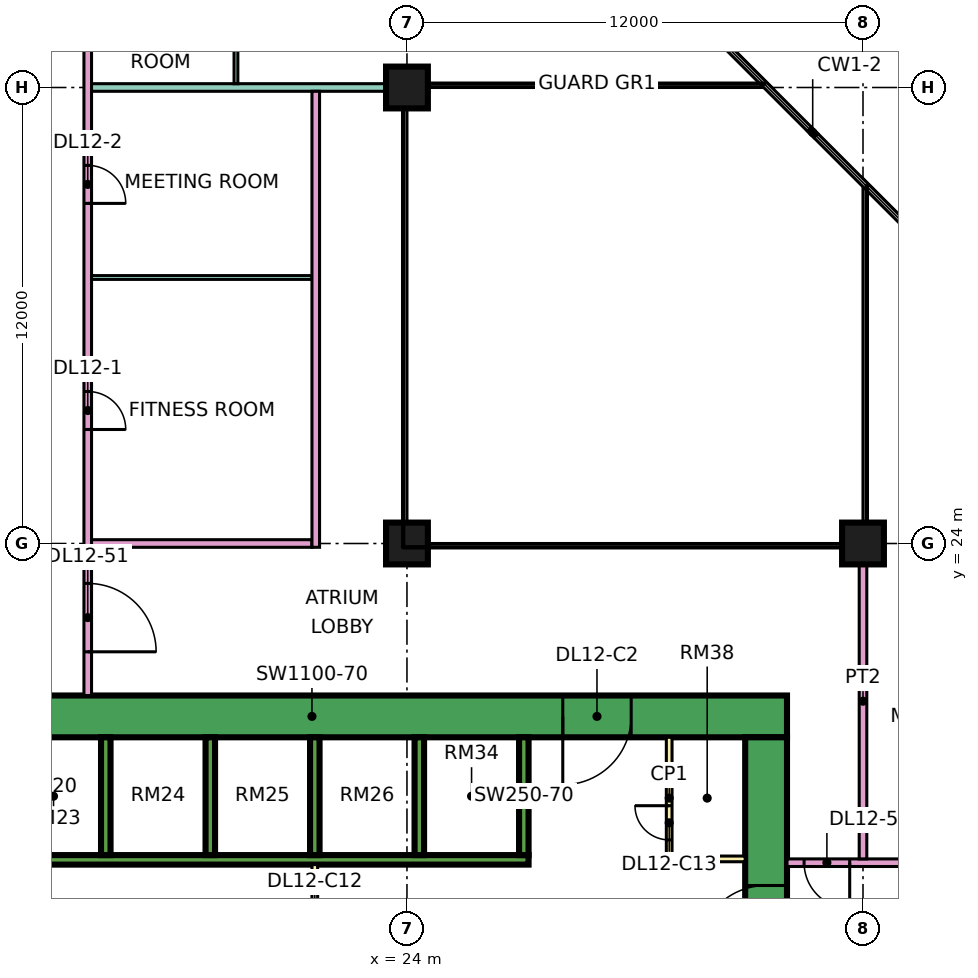
"""IFC4 building model, lengths in metres.
Left out: names, types, materials, properties, quantities, classifications, styles, units other than length and angle.
Written with IfcOpenShell. Run it as: python <this file> out.ifc"""

import sys

from ifc_helpers import new_model, si_unit, direction, frame, frame_2d, origin, origin_2d, place, context, subcontext, project, spatial, rectangle, extrude, element, fill, save


model = new_model("IFC4")
c1 = context("Model", 3, precision=1e-05, world=origin(), true_north=direction((0.0, 1.0)))
c2 = subcontext(c1, "Body", "Model", "MODEL_VIEW")
j1 = project(units=[si_unit("LENGTHUNIT", "METRE"), si_unit("PLANEANGLEUNIT", "RADIAN")], contexts=[c1])
p1 = place(None, origin())
s1 = spatial("IfcSite", under=j1, at=p1, CompositionType="ELEMENT")
p2 = place(p1, origin())
s2 = spatial("IfcBuilding", under=s1, at=p2, CompositionType="ELEMENT")
p3 = place(p2, frame((0.0, 0.0, 60.15)))
s3 = spatial("IfcBuildingStorey", under=s2, at=p3, CompositionType="ELEMENT", Elevation=60.15)
for number, where, z_axis, x_axis in (
    (1, (24.0, 24.0, 0.0), (0.0, 0.0, 1.0), (1.0, 0.0, 0.0)),
    (2, (24.0, 36.0, 0.0), (0.0, 0.0, 1.0), (1.0, 0.0, 0.0)),
    (3, (36.0, 24.0, 0.0), (0.0, 0.0, 1.0), (1.0, 0.0, 0.0)),
):
    element("IfcColumn", number, at=place(p3, frame(where, z_axis=z_axis, x_axis=x_axis)), inside=s3, PredefinedType="COLUMN", context=c2, shape_type="SweptSolid", body=[
        extrude(rectangle(XDim=1.1, YDim=1.1, at=origin_2d()), origin(), (0.0, 0.0, 1.0), 3.75),
    ])
p4 = place(p3, frame((9.0, 19.45, 0.0), z_axis=(0.0, 0.0, 1.0), x_axis=(1.0, 0.0, 0.0)))
e4 = element("IfcWall", 4, at=p4, inside=s3, PredefinedType="SHEAR", context=c2, shape_type="SweptSolid", body=[
    extrude(rectangle(XDim=25.0, YDim=1.1, at=frame_2d((12.5, 0.0))), origin(), (0.0, 0.0, 1.0), 3.75),
])
p5 = place(p4, frame((19.1, 0.0, 0.0)))
e5 = element("IfcOpeningElement", 5, at=p5, cuts=e4, PredefinedType="OPENING", context=c2, shape_type="SweptSolid", body=[
    extrude(rectangle(XDim=1.8, YDim=2.4, at=frame_2d((0.9, 1.2))), frame((0.0, 0.56, 0.0), z_axis=(0.0, -1.0, 0.0), x_axis=(1.0, 0.0, 0.0)), (0.0, 0.0, 1.0), 1.12),
])
p6 = place(p3, frame((33.45, 8.1, 0.0), z_axis=(0.0, 0.0, 1.0), x_axis=(0.0, 1.0, 0.0)))
e6 = element("IfcWall", 6, at=p6, inside=s3, PredefinedType="SHEAR", context=c2, shape_type="SweptSolid", body=[
    extrude(rectangle(XDim=10.8, YDim=1.1, at=frame_2d((5.4, 0.0))), origin(), (0.0, 0.0, 1.0), 3.75),
])
p7 = place(p6, frame((5.1, 0.0, 0.0)))
e7 = element("IfcOpeningElement", 7, at=p7, cuts=e6, PredefinedType="OPENING", context=c2, shape_type="SweptSolid", body=[
    extrude(rectangle(XDim=1.8, YDim=2.4, at=frame_2d((0.9, 1.2))), frame((0.0, 0.56, 0.0), z_axis=(0.0, -1.0, 0.0), x_axis=(1.0, 0.0, 0.0)), (0.0, 0.0, 1.0), 1.12),
])
p8 = place(p3, frame((13.45, 15.675, 0.0), z_axis=(0.0, 0.0, 1.0), x_axis=(1.0, 0.0, 0.0)))
e8 = element("IfcWall", 8, at=p8, inside=s3, PredefinedType="SHEAR", context=c2, shape_type="SweptSolid", body=[
    extrude(rectangle(XDim=13.75, YDim=0.25, at=frame_2d((6.875, 0.0))), origin(), (0.0, 0.0, 1.0), 3.75),
])
for number, where, z_axis, x_axis in (
    (9, (16.075, 15.8, 0.0), (0.0, 0.0, 1.0), (0.0, 1.0, 0.0)),
    (10, (18.825, 15.8, 0.0), (0.0, 0.0, 1.0), (0.0, 1.0, 0.0)),
    (11, (21.575, 15.8, 0.0), (0.0, 0.0, 1.0), (0.0, 1.0, 0.0)),
    (12, (24.325, 15.8, 0.0), (0.0, 0.0, 1.0), (0.0, 1.0, 0.0)),
    (13, (27.075, 15.8, 0.0), (0.0, 0.0, 1.0), (0.0, 1.0, 0.0)),
):
    element("IfcWall", number, at=place(p3, frame(where, z_axis=z_axis, x_axis=x_axis)), inside=s3, PredefinedType="SHEAR", context=c2, shape_type="SweptSolid", body=[
        extrude(rectangle(XDim=3.1, YDim=0.25, at=frame_2d((1.55, 0.0))), origin(), (0.0, 0.0, 1.0), 3.75),
    ])
p9 = place(p3, frame((21.575, 11.45, 0.0), z_axis=(0.0, 0.0, 1.0), x_axis=(0.0, 1.0, 0.0)))
e14 = element("IfcWall", 14, at=p9, inside=s3, PredefinedType="PARTITIONING", context=c2, shape_type="SweptSolid", body=[
    extrude(rectangle(XDim=4.1, YDim=0.15, at=frame_2d((2.05, 0.0))), origin(), (0.0, 0.0, 1.0), 3.35),
])
p10 = place(p9, frame((1.15, 0.0, 0.0)))
e15 = element("IfcOpeningElement", 15, at=p10, cuts=e14, PredefinedType="OPENING", context=c2, shape_type="SweptSolid", body=[
    extrude(rectangle(XDim=1.8, YDim=2.4, at=frame_2d((0.9, 1.2))), frame((0.0, 0.085, 0.0), z_axis=(0.0, -1.0, 0.0), x_axis=(1.0, 0.0, 0.0)), (0.0, 0.0, 1.0), 0.17),
])
p11 = place(p3, frame((30.9, 15.7, 0.0), z_axis=(0.0, 0.0, 1.0), x_axis=(0.0, 1.0, 0.0)))
e16 = element("IfcWall", 16, at=p11, inside=s3, PredefinedType="PARTITIONING", context=c2, shape_type="SweptSolid", body=[
    extrude(rectangle(XDim=3.2, YDim=0.15, at=frame_2d((1.6, 0.0))), origin(), (0.0, 0.0, 1.0), 3.35),
])
p12 = place(p11, frame((0.5, 0.0, 0.0)))
e17 = element("IfcOpeningElement", 17, at=p12, cuts=e16, PredefinedType="OPENING", context=c2, shape_type="SweptSolid", body=[
    extrude(rectangle(XDim=0.9, YDim=2.1, at=frame_2d((0.45, 1.05))), frame((0.0, 0.085, 0.0), z_axis=(0.0, -1.0, 0.0), x_axis=(1.0, 0.0, 0.0)), (0.0, 0.0, 1.0), 0.17),
])
p13 = place(p3, frame((30.9, 15.7, 0.0), z_axis=(0.0, 0.0, 1.0), x_axis=(1.0, 0.0, 0.0)))
e18 = element("IfcWall", 18, at=p13, inside=s3, PredefinedType="PARTITIONING", context=c2, shape_type="SweptSolid", body=[
    extrude(rectangle(XDim=2.0, YDim=0.15, at=frame_2d((1.0, 0.0))), origin(), (0.0, 0.0, 1.0), 3.35),
])
p14 = place(p3, frame((15.6, 20.0, 0.0), z_axis=(0.0, 0.0, 1.0), x_axis=(0.0, 1.0, 0.0)))
e19 = element("IfcWall", 19, at=p14, inside=s3, PredefinedType="PARTITIONING", context=c2, shape_type="SweptSolid", body=[
    extrude(rectangle(XDim=27.775, YDim=0.2, at=frame_2d((13.887, 0.0))), origin(), (0.0, 0.0, 1.0), 3.35),
])
p15 = place(p14, frame((7.0, 0.0, 0.0)))
e20 = element("IfcOpeningElement", 20, at=p15, cuts=e19, PredefinedType="OPENING", context=c2, shape_type="SweptSolid", body=[
    extrude(rectangle(XDim=1.0, YDim=2.1, at=frame_2d((0.5, 1.05))), frame((0.0, 0.11, 0.0), z_axis=(0.0, -1.0, 0.0), x_axis=(1.0, 0.0, 0.0)), (0.0, 0.0, 1.0), 0.22),
])
p16 = place(p14, frame((12.95, 0.0, 0.0)))
e21 = element("IfcOpeningElement", 21, at=p16, cuts=e19, PredefinedType="OPENING", context=c2, shape_type="SweptSolid", body=[
    extrude(rectangle(XDim=1.0, YDim=2.1, at=frame_2d((0.5, 1.05))), frame((0.0, 0.11, 0.0), z_axis=(0.0, -1.0, 0.0), x_axis=(1.0, 0.0, 0.0)), (0.0, 0.0, 1.0), 0.22),
])
p17 = place(p14, frame((17.35, 0.0, 0.0)))
e22 = element("IfcOpeningElement", 22, at=p17, cuts=e19, PredefinedType="OPENING", context=c2, shape_type="SweptSolid", body=[
    extrude(rectangle(XDim=1.0, YDim=2.1, at=frame_2d((0.5, 1.05))), frame((0.0, 0.11, 0.0), z_axis=(0.0, -1.0, 0.0), x_axis=(1.0, 0.0, 0.0)), (0.0, 0.0, 1.0), 0.22),
])
p18 = place(p14, frame((1.15, 0.0, 0.0)))
e23 = element("IfcOpeningElement", 23, at=p18, cuts=e19, PredefinedType="OPENING", context=c2, shape_type="SweptSolid", body=[
    extrude(rectangle(XDim=1.8, YDim=2.1, at=frame_2d((0.9, 1.05))), frame((0.0, 0.11, 0.0), z_axis=(0.0, -1.0, 0.0), x_axis=(1.0, 0.0, 0.0)), (0.0, 0.0, 1.0), 0.22),
])
p19 = place(p14, frame((25.9, 0.0, 0.0)))
e24 = element("IfcOpeningElement", 24, at=p19, cuts=e19, PredefinedType="OPENING", context=c2, shape_type="SweptSolid", body=[
    extrude(rectangle(XDim=1.0, YDim=2.1, at=frame_2d((0.5, 1.05))), frame((0.0, 0.11, 0.0), z_axis=(0.0, -1.0, 0.0), x_axis=(1.0, 0.0, 0.0)), (0.0, 0.0, 1.0), 0.22),
])
p20 = place(p3, frame((15.7, 24.0, 0.0), z_axis=(0.0, 0.0, 1.0), x_axis=(1.0, 0.0, 0.0)))
e25 = element("IfcWall", 25, at=p20, inside=s3, PredefinedType="PARTITIONING", context=c2, shape_type="SweptSolid", body=[
    extrude(rectangle(XDim=5.8, YDim=0.2, at=frame_2d((2.9, 0.0))), origin(), (0.0, 0.0, 1.0), 3.35),
])
p21 = place(p3, frame((15.7, 31.0, 0.0), z_axis=(0.0, 0.0, 1.0), x_axis=(1.0, 0.0, 0.0)))
e26 = element("IfcWall", 26, at=p21, inside=s3, PredefinedType="PARTITIONING", context=c2, shape_type="SweptSolid", body=[
    extrude(rectangle(XDim=5.8, YDim=0.1, at=frame_2d((2.9, 0.0))), origin(), (0.0, 0.0, 1.0), 3.35),
])
p22 = place(p3, frame((15.7, 36.0, 0.0), z_axis=(0.0, 0.0, 1.0), x_axis=(1.0, 0.0, 0.0)))
e27 = element("IfcWall", 27, at=p22, inside=s3, PredefinedType="PARTITIONING", context=c2, shape_type="SweptSolid", body=[
    extrude(rectangle(XDim=8.3, YDim=0.2, at=frame_2d((4.15, 0.0))), origin(), (0.0, 0.0, 1.0), 3.35),
])
p23 = place(p3, frame((19.5, 36.1, 0.0), z_axis=(0.0, 0.0, 1.0), x_axis=(0.0, 1.0, 0.0)))
e28 = element("IfcWall", 28, at=p23, inside=s3, PredefinedType="PARTITIONING", context=c2, shape_type="SweptSolid", body=[
    extrude(rectangle(XDim=5.95, YDim=0.1, at=frame_2d((2.975, 0.0))), origin(), (0.0, 0.0, 1.0), 3.35),
])
p24 = place(p23, frame((0.95, 0.0, 0.0)))
e29 = element("IfcOpeningElement", 29, at=p24, cuts=e28, PredefinedType="OPENING", context=c2, shape_type="SweptSolid", body=[
    extrude(rectangle(XDim=0.9, YDim=2.1, at=frame_2d((0.45, 1.05))), frame((0.0, 0.06, 0.0), z_axis=(0.0, -1.0, 0.0), x_axis=(1.0, 0.0, 0.0)), (0.0, 0.0, 1.0), 0.12),
])
p25 = place(p23, frame((3.95, 0.0, 0.0)))
e30 = element("IfcOpeningElement", 30, at=p25, cuts=e28, PredefinedType="OPENING", context=c2, shape_type="SweptSolid", body=[
    extrude(rectangle(XDim=0.9, YDim=2.1, at=frame_2d((0.45, 1.05))), frame((0.0, 0.06, 0.0), z_axis=(0.0, -1.0, 0.0), x_axis=(1.0, 0.0, 0.0)), (0.0, 0.0, 1.0), 0.12),
])
p26 = place(p3, frame((21.6, 23.9, 0.0), z_axis=(0.0, 0.0, 1.0), x_axis=(0.0, 1.0, 0.0)))
e31 = element("IfcWall", 31, at=p26, inside=s3, PredefinedType="PARTITIONING", context=c2, shape_type="SweptSolid", body=[
    extrude(rectangle(XDim=12.0, YDim=0.2, at=frame_2d((6.0, 0.0))), origin(), (0.0, 0.0, 1.0), 3.35),
])
p27 = place(p3, frame((34.0, 15.6, 0.0), z_axis=(0.0, 0.0, 1.0), x_axis=(1.0, 0.0, 0.0)))
e32 = element("IfcWall", 32, at=p27, inside=s3, PredefinedType="PARTITIONING", context=c2, shape_type="SweptSolid", body=[
    extrude(rectangle(XDim=10.35, YDim=0.2, at=frame_2d((5.175, 0.0))), origin(), (0.0, 0.0, 1.0), 3.35),
])
p28 = place(p27, frame((5.6, 0.0, 0.0)))
e33 = element("IfcOpeningElement", 33, at=p28, cuts=e32, PredefinedType="OPENING", context=c2, shape_type="SweptSolid", body=[
    extrude(rectangle(XDim=1.0, YDim=2.1, at=frame_2d((0.5, 1.05))), frame((0.0, 0.11, 0.0), z_axis=(0.0, -1.0, 0.0), x_axis=(1.0, 0.0, 0.0)), (0.0, 0.0, 1.0), 0.22),
])
p29 = place(p27, frame((0.45, 0.0, 0.0)))
e34 = element("IfcOpeningElement", 34, at=p29, cuts=e32, PredefinedType="OPENING", context=c2, shape_type="SweptSolid", body=[
    extrude(rectangle(XDim=1.2, YDim=2.1, at=frame_2d((0.6, 1.05))), frame((0.0, 0.11, 0.0), z_axis=(0.0, -1.0, 0.0), x_axis=(1.0, 0.0, 0.0)), (0.0, 0.0, 1.0), 0.22),
])
p30 = place(p3, frame((36.0, 15.7, 0.0), z_axis=(0.0, 0.0, 1.0), x_axis=(0.0, 1.0, 0.0)))
e35 = element("IfcWall", 35, at=p30, inside=s3, PredefinedType="PARTITIONING", context=c2, shape_type="SweptSolid", body=[
    extrude(rectangle(XDim=8.3, YDim=0.2, at=frame_2d((4.15, 0.0))), origin(), (0.0, 0.0, 1.0), 3.35),
])
p31 = place(p7, origin())
e36 = element("IfcDoor", 36, at=p31, inside=s3, OperationType="DOUBLE_DOOR_SINGLE_SWING", PredefinedType="DOOR", context=c2, shape_type="SweptSolid", body=[
    extrude(rectangle(XDim=1.8, YDim=2.4, at=frame_2d((0.9, 1.2))), frame((0.0, 0.025, 0.0), z_axis=(0.0, -1.0, 0.0), x_axis=(1.0, 0.0, 0.0)), (0.0, 0.0, 1.0), 0.05),
])
fill(e7, e36)
p32 = place(p5, frame((1.8, 0.0, 0.0), z_axis=(0.0, 0.0, 1.0), x_axis=(-1.0, 0.0, 0.0)))
e37 = element("IfcDoor", 37, at=p32, inside=s3, OperationType="DOUBLE_DOOR_SINGLE_SWING", PredefinedType="DOOR", context=c2, shape_type="SweptSolid", body=[
    extrude(rectangle(XDim=1.8, YDim=2.4, at=frame_2d((0.9, 1.2))), frame((0.0, 0.025, 0.0), z_axis=(0.0, -1.0, 0.0), x_axis=(1.0, 0.0, 0.0)), (0.0, 0.0, 1.0), 0.05),
])
fill(e5, e37)
p33 = place(p12, frame((0.9, 0.0, 0.0), z_axis=(0.0, 0.0, 1.0), x_axis=(-1.0, 0.0, 0.0)))
e38 = element("IfcDoor", 38, at=p33, inside=s3, OperationType="SINGLE_SWING_RIGHT", PredefinedType="DOOR", context=c2, shape_type="SweptSolid", body=[
    extrude(rectangle(XDim=0.9, YDim=2.1, at=frame_2d((0.45, 1.05))), frame((0.0, 0.025, 0.0), z_axis=(0.0, -1.0, 0.0), x_axis=(1.0, 0.0, 0.0)), (0.0, 0.0, 1.0), 0.05),
])
fill(e17, e38)
p34 = place(p15, frame((1.0, 0.0, 0.0), z_axis=(0.0, 0.0, 1.0), x_axis=(-1.0, 0.0, 0.0)))
e39 = element("IfcDoor", 39, at=p34, inside=s3, OperationType="SINGLE_SWING_LEFT", PredefinedType="DOOR", context=c2, shape_type="SweptSolid", body=[
    extrude(rectangle(XDim=1.0, YDim=2.1, at=frame_2d((0.5, 1.05))), frame((0.0, 0.025, 0.0), z_axis=(0.0, -1.0, 0.0), x_axis=(1.0, 0.0, 0.0)), (0.0, 0.0, 1.0), 0.05),
])
fill(e20, e39)
p35 = place(p16, frame((1.0, 0.0, 0.0), z_axis=(0.0, 0.0, 1.0), x_axis=(-1.0, 0.0, 0.0)))
e40 = element("IfcDoor", 40, at=p35, inside=s3, OperationType="SINGLE_SWING_LEFT", PredefinedType="DOOR", context=c2, shape_type="SweptSolid", body=[
    extrude(rectangle(XDim=1.0, YDim=2.1, at=frame_2d((0.5, 1.05))), frame((0.0, 0.025, 0.0), z_axis=(0.0, -1.0, 0.0), x_axis=(1.0, 0.0, 0.0)), (0.0, 0.0, 1.0), 0.05),
])
fill(e21, e40)
p36 = place(p29, origin())
e41 = element("IfcDoor", 41, at=p36, inside=s3, OperationType="SINGLE_SWING_RIGHT", PredefinedType="DOOR", context=c2, shape_type="SweptSolid", body=[
    extrude(rectangle(XDim=1.2, YDim=2.1, at=frame_2d((0.6, 1.05))), frame((0.0, 0.025, 0.0), z_axis=(0.0, -1.0, 0.0), x_axis=(1.0, 0.0, 0.0)), (0.0, 0.0, 1.0), 0.05),
])
fill(e34, e41)
p37 = place(p18, frame((1.8, 0.0, 0.0), z_axis=(0.0, 0.0, 1.0), x_axis=(-1.0, 0.0, 0.0)))
e42 = element("IfcDoor", 42, at=p37, inside=s3, OperationType="DOUBLE_DOOR_SINGLE_SWING", PredefinedType="DOOR", context=c2, shape_type="SweptSolid", body=[
    extrude(rectangle(XDim=1.8, YDim=2.1, at=frame_2d((0.9, 1.05))), frame((0.0, 0.025, 0.0), z_axis=(0.0, -1.0, 0.0), x_axis=(1.0, 0.0, 0.0)), (0.0, 0.0, 1.0), 0.05),
])
fill(e23, e42)
save(model, sys.argv[1])
